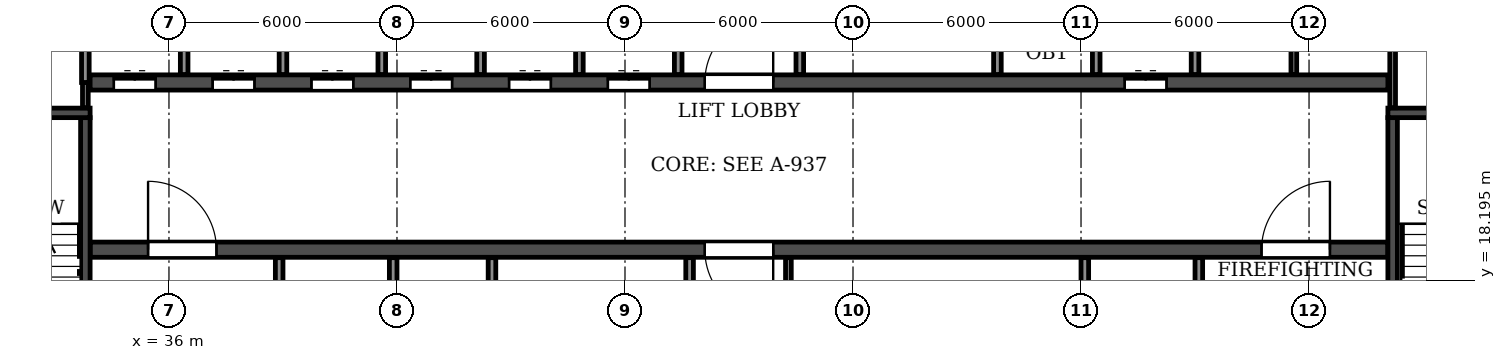
"""IFC4 building model, lengths in metres.
Left out: names, types, materials, properties, quantities, classifications, styles, units other than length and angle.
Written with IfcOpenShell. Run it as: python <this file> out.ifc"""

import sys

from ifc_helpers import new_model, si_unit, direction, frame, frame_2d, origin, place, context, subcontext, project, spatial, rectangle, extrude, element, fill, save


model = new_model("IFC4")
c1 = context("Model", 3, precision=1e-05, world=origin(), true_north=direction((0.0, 1.0)))
c2 = subcontext(c1, "Body", "Model", "MODEL_VIEW")
j1 = project(units=[si_unit("LENGTHUNIT", "METRE"), si_unit("PLANEANGLEUNIT", "RADIAN")], contexts=[c1])
p1 = place(None, origin())
s1 = spatial("IfcSite", under=j1, at=p1, CompositionType="ELEMENT")
p2 = place(p1, origin())
s2 = spatial("IfcBuilding", under=s1, at=p2, CompositionType="ELEMENT")
p3 = place(p2, frame((0.0, 0.0, 211.5)))
s3 = spatial("IfcBuildingStorey", under=s2, at=p3, CompositionType="ELEMENT", Elevation=211.5)
p4 = place(p3, frame((33.925, 19.0, 0.0), z_axis=(0.0, 0.0, 1.0), x_axis=(1.0, 0.0, 0.0)))
e1 = element("IfcWall", 1, at=p4, inside=s3, PredefinedType="SOLIDWALL", context=c2, shape_type="SweptSolid", body=[
    extrude(rectangle(XDim=34.15, YDim=0.4, at=frame_2d((17.075, 0.0))), origin(), (0.0, 0.0, 1.0), 2.95),
])
p5 = place(p4, frame((16.175, 0.0, 0.0)))
e2 = element("IfcOpeningElement", 2, at=p5, cuts=e1, PredefinedType="OPENING", context=c2, shape_type="SweptSolid", body=[
    extrude(rectangle(XDim=1.8, YDim=2.1, at=frame_2d((0.9, 1.05))), frame((0.0, 0.21, 0.0), z_axis=(0.0, -1.0, 0.0), x_axis=(1.0, 0.0, 0.0)), (0.0, 0.0, 1.0), 0.42),
])
p6 = place(p4, frame((1.525, 0.0, 0.0)))
e3 = element("IfcOpeningElement", 3, at=p6, cuts=e1, PredefinedType="OPENING", context=c2, shape_type="SweptSolid", body=[
    extrude(rectangle(XDim=1.8, YDim=2.1, at=frame_2d((0.9, 1.05))), frame((0.0, 0.21, 0.0), z_axis=(0.0, -1.0, 0.0), x_axis=(1.0, 0.0, 0.0)), (0.0, 0.0, 1.0), 0.42),
])
p7 = place(p4, frame((30.825, 0.0, 0.0)))
e4 = element("IfcOpeningElement", 4, at=p7, cuts=e1, PredefinedType="OPENING", context=c2, shape_type="SweptSolid", body=[
    extrude(rectangle(XDim=1.8, YDim=2.1, at=frame_2d((0.9, 1.05))), frame((0.0, 0.21, 0.0), z_axis=(0.0, -1.0, 0.0), x_axis=(1.0, 0.0, 0.0)), (0.0, 0.0, 1.0), 0.42),
])
p8 = place(p3, frame((33.925, 23.4, 0.0), z_axis=(0.0, 0.0, 1.0), x_axis=(1.0, 0.0, 0.0)))
e5 = element("IfcWall", 5, at=p8, inside=s3, PredefinedType="SOLIDWALL", context=c2, shape_type="SweptSolid", body=[
    extrude(rectangle(XDim=34.15, YDim=0.4, at=frame_2d((17.075, 0.0))), origin(), (0.0, 0.0, 1.0), 2.95),
])
p9 = place(p8, frame((16.175, 0.0, 0.0)))
e6 = element("IfcOpeningElement", 6, at=p9, cuts=e5, PredefinedType="OPENING", context=c2, shape_type="SweptSolid", body=[
    extrude(rectangle(XDim=1.8, YDim=2.1, at=frame_2d((0.9, 1.05))), frame((0.0, 0.21, 0.0), z_axis=(0.0, -1.0, 0.0), x_axis=(1.0, 0.0, 0.0)), (0.0, 0.0, 1.0), 0.42),
])
p10 = place(p8, frame((0.625, 0.0, 0.0)))
e7 = element("IfcOpeningElement", 7, at=p10, cuts=e5, PredefinedType="OPENING", context=c2, shape_type="SweptSolid", body=[
    extrude(rectangle(XDim=1.1, YDim=2.1, at=frame_2d((0.55, 1.05))), frame((0.0, 0.21, 0.0), z_axis=(0.0, -1.0, 0.0), x_axis=(1.0, 0.0, 0.0)), (0.0, 0.0, 1.0), 0.42),
])
p11 = place(p8, frame((3.225, 0.0, 0.0)))
e8 = element("IfcOpeningElement", 8, at=p11, cuts=e5, PredefinedType="OPENING", context=c2, shape_type="SweptSolid", body=[
    extrude(rectangle(XDim=1.1, YDim=2.1, at=frame_2d((0.55, 1.05))), frame((0.0, 0.21, 0.0), z_axis=(0.0, -1.0, 0.0), x_axis=(1.0, 0.0, 0.0)), (0.0, 0.0, 1.0), 0.42),
])
p12 = place(p8, frame((5.825, 0.0, 0.0)))
e9 = element("IfcOpeningElement", 9, at=p12, cuts=e5, PredefinedType="OPENING", context=c2, shape_type="SweptSolid", body=[
    extrude(rectangle(XDim=1.1, YDim=2.1, at=frame_2d((0.55, 1.05))), frame((0.0, 0.21, 0.0), z_axis=(0.0, -1.0, 0.0), x_axis=(1.0, 0.0, 0.0)), (0.0, 0.0, 1.0), 0.42),
])
p13 = place(p8, frame((8.425, 0.0, 0.0)))
e10 = element("IfcOpeningElement", 10, at=p13, cuts=e5, PredefinedType="OPENING", context=c2, shape_type="SweptSolid", body=[
    extrude(rectangle(XDim=1.1, YDim=2.1, at=frame_2d((0.55, 1.05))), frame((0.0, 0.21, 0.0), z_axis=(0.0, -1.0, 0.0), x_axis=(1.0, 0.0, 0.0)), (0.0, 0.0, 1.0), 0.42),
])
p14 = place(p8, frame((11.025, 0.0, 0.0)))
e11 = element("IfcOpeningElement", 11, at=p14, cuts=e5, PredefinedType="OPENING", context=c2, shape_type="SweptSolid", body=[
    extrude(rectangle(XDim=1.1, YDim=2.1, at=frame_2d((0.55, 1.05))), frame((0.0, 0.21, 0.0), z_axis=(0.0, -1.0, 0.0), x_axis=(1.0, 0.0, 0.0)), (0.0, 0.0, 1.0), 0.42),
])
p15 = place(p8, frame((13.625, 0.0, 0.0)))
e12 = element("IfcOpeningElement", 12, at=p15, cuts=e5, PredefinedType="OPENING", context=c2, shape_type="SweptSolid", body=[
    extrude(rectangle(XDim=1.1, YDim=2.1, at=frame_2d((0.55, 1.05))), frame((0.0, 0.21, 0.0), z_axis=(0.0, -1.0, 0.0), x_axis=(1.0, 0.0, 0.0)), (0.0, 0.0, 1.0), 0.42),
])
p16 = place(p8, frame((27.225, 0.0, 0.0)))
e13 = element("IfcOpeningElement", 13, at=p16, cuts=e5, PredefinedType="OPENING", context=c2, shape_type="SweptSolid", body=[
    extrude(rectangle(XDim=1.1, YDim=2.1, at=frame_2d((0.55, 1.05))), frame((0.0, 0.21, 0.0), z_axis=(0.0, -1.0, 0.0), x_axis=(1.0, 0.0, 0.0)), (0.0, 0.0, 1.0), 0.42),
])
p17 = place(p3, frame((33.8, 14.8, 0.0), z_axis=(0.0, 0.0, 1.0), x_axis=(0.0, 1.0, 0.0)))
e14 = element("IfcWall", 14, at=p17, inside=s3, PredefinedType="SOLIDWALL", context=c2, shape_type="SweptSolid", body=[
    extrude(rectangle(XDim=7.675, YDim=0.25, at=frame_2d((3.837, 0.0))), origin(), (0.0, 0.0, 1.0), 2.95),
])
p18 = place(p17, frame((0.5, 0.0, 0.0)))
e15 = element("IfcOpeningElement", 15, at=p18, cuts=e14, PredefinedType="OPENING", context=c2, shape_type="SweptSolid", body=[
    extrude(rectangle(XDim=1.0, YDim=2.1, at=frame_2d((0.5, 1.05))), frame((0.0, 0.135, 0.0), z_axis=(0.0, -1.0, 0.0), x_axis=(1.0, 0.0, 0.0)), (0.0, 0.0, 1.0), 0.27),
])
p19 = place(p3, frame((29.875, 22.6, 0.0), z_axis=(0.0, 0.0, 1.0), x_axis=(1.0, 0.0, 0.0)))
e16 = element("IfcWall", 16, at=p19, inside=s3, PredefinedType="SOLIDWALL", context=c2, shape_type="SweptSolid", body=[
    extrude(rectangle(XDim=4.05, YDim=0.25, at=frame_2d((2.025, 0.0))), origin(), (0.0, 0.0, 1.0), 2.95),
])
p20 = place(p3, frame((68.2, 14.8, 0.0), z_axis=(0.0, 0.0, 1.0), x_axis=(0.0, 1.0, 0.0)))
e17 = element("IfcWall", 17, at=p20, inside=s3, PredefinedType="SOLIDWALL", context=c2, shape_type="SweptSolid", body=[
    extrude(rectangle(XDim=7.675, YDim=0.25, at=frame_2d((3.837, 0.0))), origin(), (0.0, 0.0, 1.0), 2.95),
])
p21 = place(p20, frame((0.5, 0.0, 0.0)))
e18 = element("IfcOpeningElement", 18, at=p21, cuts=e17, PredefinedType="OPENING", context=c2, shape_type="SweptSolid", body=[
    extrude(rectangle(XDim=1.0, YDim=2.1, at=frame_2d((0.5, 1.05))), frame((0.0, 0.135, 0.0), z_axis=(0.0, -1.0, 0.0), x_axis=(1.0, 0.0, 0.0)), (0.0, 0.0, 1.0), 0.27),
])
p22 = place(p3, frame((68.075, 22.6, 0.0), z_axis=(0.0, 0.0, 1.0), x_axis=(1.0, 0.0, 0.0)))
e19 = element("IfcWall", 19, at=p22, inside=s3, PredefinedType="SOLIDWALL", context=c2, shape_type="SweptSolid", body=[
    extrude(rectangle(XDim=4.05, YDim=0.25, at=frame_2d((2.025, 0.0))), origin(), (0.0, 0.0, 1.0), 2.95),
])
for number, where, z_axis, x_axis in (
    (20, (52.3, 14.81, 0.0), (0.0, 0.0, 1.0), (0.0, 1.0, 0.0)),
    (21, (65.6, 23.61, 0.0), (0.0, 0.0, 1.0), (0.0, 1.0, 0.0)),
):
    element("IfcWall", number, at=place(p3, frame(where, z_axis=z_axis, x_axis=x_axis)), inside=s3, PredefinedType="PARTITIONING", context=c2, shape_type="SweptSolid", body=[
        extrude(rectangle(XDim=3.98, YDim=0.15, at=frame_2d((1.99, 0.0))), origin(), (0.0, 0.0, 1.0), 2.95),
    ])
for number, where, z_axis, x_axis in (
    (22, (44.5, 14.81, 0.0), (0.0, 0.0, 1.0), (0.0, 1.0, 0.0)),
    (23, (49.7, 14.81, 0.0), (0.0, 0.0, 1.0), (0.0, 1.0, 0.0)),
    (24, (52.6, 23.61, 0.0), (0.0, 0.0, 1.0), (0.0, 1.0, 0.0)),
):
    element("IfcWall", number, at=place(p3, frame(where, z_axis=z_axis, x_axis=x_axis)), inside=s3, PredefinedType="PARTITIONING", context=c2, shape_type="SweptSolid", body=[
        extrude(rectangle(XDim=3.98, YDim=0.2, at=frame_2d((1.99, 0.0))), origin(), (0.0, 0.0, 1.0), 2.95),
    ])
p23 = place(p3, frame((33.8, 22.735, 0.0), z_axis=(0.0, 0.0, 1.0), x_axis=(0.0, 1.0, 0.0)))
e25 = element("IfcWall", 25, at=p23, inside=s3, PredefinedType="PARTITIONING", context=c2, shape_type="SweptSolid", body=[
    extrude(rectangle(XDim=0.665, YDim=0.15, at=frame_2d((0.333, 0.0))), origin(), (0.0, 0.0, 1.0), 2.95),
])
p24 = place(p3, frame((68.2, 22.735, 0.0), z_axis=(0.0, 0.0, 1.0), x_axis=(0.0, 1.0, 0.0)))
e26 = element("IfcWall", 26, at=p24, inside=s3, PredefinedType="PARTITIONING", context=c2, shape_type="SweptSolid", body=[
    extrude(rectangle(XDim=4.855, YDim=0.15, at=frame_2d((2.427, 0.0))), origin(), (0.0, 0.0, 1.0), 2.95),
])
p25 = place(p3, frame((33.8, 23.4, 0.0), z_axis=(0.0, 0.0, 1.0), x_axis=(0.0, 1.0, 0.0)))
e27 = element("IfcWall", 27, at=p25, inside=s3, PredefinedType="PARTITIONING", context=c2, shape_type="SweptSolid", body=[
    extrude(rectangle(XDim=2.7, YDim=0.2, at=frame_2d((1.35, 0.0))), origin(), (0.0, 0.0, 1.0), 2.95),
])
p26 = place(p3, frame((36.4, 23.61, 0.0), z_axis=(0.0, 0.0, 1.0), x_axis=(0.0, 1.0, 0.0)))
e28 = element("IfcWall", 28, at=p26, inside=s3, PredefinedType="PARTITIONING", context=c2, shape_type="SweptSolid", body=[
    extrude(rectangle(XDim=2.49, YDim=0.2, at=frame_2d((1.245, 0.0))), origin(), (0.0, 0.0, 1.0), 2.95),
])
p27 = place(p3, frame((38.9, 14.81, 0.0), z_axis=(0.0, 0.0, 1.0), x_axis=(0.0, 1.0, 0.0)))
e29 = element("IfcWall", 29, at=p27, inside=s3, PredefinedType="PARTITIONING", context=c2, shape_type="SweptSolid", body=[
    extrude(rectangle(XDim=3.98, YDim=0.2, at=frame_2d((1.99, 0.0))), origin(), (0.0, 0.0, 1.0), 2.95),
])
p28 = place(p27, frame((1.44, 0.0, 0.0)))
e30 = element("IfcOpeningElement", 30, at=p28, cuts=e29, PredefinedType="OPENING", context=c2, shape_type="SweptSolid", body=[
    extrude(rectangle(XDim=1.1, YDim=2.1, at=frame_2d((0.55, 1.05))), frame((0.0, 0.11, 0.0), z_axis=(0.0, -1.0, 0.0), x_axis=(1.0, 0.0, 0.0)), (0.0, 0.0, 1.0), 0.22),
])
for number, where, z_axis, x_axis in (
    (31, (39.0, 23.61, 0.0), (0.0, 0.0, 1.0), (0.0, 1.0, 0.0)),
    (32, (41.6, 23.61, 0.0), (0.0, 0.0, 1.0), (0.0, 1.0, 0.0)),
):
    element("IfcWall", number, at=place(p3, frame(where, z_axis=z_axis, x_axis=x_axis)), inside=s3, PredefinedType="PARTITIONING", context=c2, shape_type="SweptSolid", body=[
        extrude(rectangle(XDim=2.49, YDim=0.2, at=frame_2d((1.245, 0.0))), origin(), (0.0, 0.0, 1.0), 2.95),
    ])
for number, where, z_axis, x_axis in (
    (33, (41.9, 14.81, 0.0), (0.0, 0.0, 1.0), (0.0, 1.0, 0.0)),
    (34, (44.2, 23.61, 0.0), (0.0, 0.0, 1.0), (0.0, 1.0, 0.0)),
    (35, (46.8, 23.61, 0.0), (0.0, 0.0, 1.0), (0.0, 1.0, 0.0)),
):
    element("IfcWall", number, at=place(p3, frame(where, z_axis=z_axis, x_axis=x_axis)), inside=s3, PredefinedType="PARTITIONING", context=c2, shape_type="SweptSolid", body=[
        extrude(rectangle(XDim=3.98, YDim=0.2, at=frame_2d((1.99, 0.0))), origin(), (0.0, 0.0, 1.0), 2.95),
    ])
for number, where, z_axis, x_axis in (
    (36, (49.4, 23.61, 0.0), (0.0, 0.0, 1.0), (0.0, 1.0, 0.0)),
    (37, (57.8, 23.61, 0.0), (0.0, 0.0, 1.0), (0.0, 1.0, 0.0)),
):
    element("IfcWall", number, at=place(p3, frame(where, z_axis=z_axis, x_axis=x_axis)), inside=s3, PredefinedType="PARTITIONING", context=c2, shape_type="SweptSolid", body=[
        extrude(rectangle(XDim=2.49, YDim=0.2, at=frame_2d((1.245, 0.0))), origin(), (0.0, 0.0, 1.0), 2.95),
    ])
p29 = place(p3, frame((60.1, 14.81, 0.0), z_axis=(0.0, 0.0, 1.0), x_axis=(0.0, 1.0, 0.0)))
e38 = element("IfcWall", 38, at=p29, inside=s3, PredefinedType="PARTITIONING", context=c2, shape_type="SweptSolid", body=[
    extrude(rectangle(XDim=3.98, YDim=0.2, at=frame_2d((1.99, 0.0))), origin(), (0.0, 0.0, 1.0), 2.95),
])
for number, where, z_axis, x_axis in (
    (39, (60.4, 23.61, 0.0), (0.0, 0.0, 1.0), (0.0, 1.0, 0.0)),
    (40, (63.0, 23.61, 0.0), (0.0, 0.0, 1.0), (0.0, 1.0, 0.0)),
):
    element("IfcWall", number, at=place(p3, frame(where, z_axis=z_axis, x_axis=x_axis)), inside=s3, PredefinedType="PARTITIONING", context=c2, shape_type="SweptSolid", body=[
        extrude(rectangle(XDim=2.49, YDim=0.2, at=frame_2d((1.245, 0.0))), origin(), (0.0, 0.0, 1.0), 2.95),
    ])
p30 = place(p3, frame((63.1, 14.81, 0.0), z_axis=(0.0, 0.0, 1.0), x_axis=(0.0, 1.0, 0.0)))
e41 = element("IfcWall", 41, at=p30, inside=s3, PredefinedType="PARTITIONING", context=c2, shape_type="SweptSolid", body=[
    extrude(rectangle(XDim=3.98, YDim=0.2, at=frame_2d((1.99, 0.0))), origin(), (0.0, 0.0, 1.0), 2.95),
])
p31 = place(p30, frame((1.44, 0.0, 0.0)))
e42 = element("IfcOpeningElement", 42, at=p31, cuts=e41, PredefinedType="OPENING", context=c2, shape_type="SweptSolid", body=[
    extrude(rectangle(XDim=1.1, YDim=2.1, at=frame_2d((0.55, 1.05))), frame((0.0, 0.11, 0.0), z_axis=(0.0, -1.0, 0.0), x_axis=(1.0, 0.0, 0.0)), (0.0, 0.0, 1.0), 0.22),
])
p32 = place(p9, origin())
e43 = element("IfcDoor", 43, at=p32, inside=s3, OperationType="DOUBLE_DOOR_SINGLE_SWING", PredefinedType="DOOR", context=c2, shape_type="SweptSolid", body=[
    extrude(rectangle(XDim=1.8, YDim=2.1, at=frame_2d((0.9, 1.05))), frame((0.0, 0.025, 0.0), z_axis=(0.0, -1.0, 0.0), x_axis=(1.0, 0.0, 0.0)), (0.0, 0.0, 1.0), 0.05),
])
fill(e6, e43)
p33 = place(p5, frame((1.8, 0.0, 0.0), z_axis=(0.0, 0.0, 1.0), x_axis=(-1.0, 0.0, 0.0)))
e44 = element("IfcDoor", 44, at=p33, inside=s3, OperationType="DOUBLE_DOOR_SINGLE_SWING", PredefinedType="DOOR", context=c2, shape_type="SweptSolid", body=[
    extrude(rectangle(XDim=1.8, YDim=2.1, at=frame_2d((0.9, 1.05))), frame((0.0, 0.025, 0.0), z_axis=(0.0, -1.0, 0.0), x_axis=(1.0, 0.0, 0.0)), (0.0, 0.0, 1.0), 0.05),
])
fill(e2, e44)
p34 = place(p10, origin())
e45 = element("IfcDoor", 45, at=p34, inside=s3, OperationType="DOUBLE_DOOR_SLIDING", PredefinedType="DOOR", context=c2, shape_type="SweptSolid", body=[
    extrude(rectangle(XDim=1.1, YDim=2.1, at=frame_2d((0.55, 1.05))), frame((0.0, 0.025, 0.0), z_axis=(0.0, -1.0, 0.0), x_axis=(1.0, 0.0, 0.0)), (0.0, 0.0, 1.0), 0.05),
])
fill(e7, e45)
p35 = place(p6, origin())
e46 = element("IfcDoor", 46, at=p35, inside=s3, OperationType="DOUBLE_DOOR_SINGLE_SWING", PredefinedType="DOOR", context=c2, shape_type="SweptSolid", body=[
    extrude(rectangle(XDim=1.8, YDim=2.1, at=frame_2d((0.9, 1.05))), frame((0.0, 0.025, 0.0), z_axis=(0.0, -1.0, 0.0), x_axis=(1.0, 0.0, 0.0)), (0.0, 0.0, 1.0), 0.05),
])
fill(e3, e46)
p36 = place(p11, origin())
e47 = element("IfcDoor", 47, at=p36, inside=s3, OperationType="DOUBLE_DOOR_SLIDING", PredefinedType="DOOR", context=c2, shape_type="SweptSolid", body=[
    extrude(rectangle(XDim=1.1, YDim=2.1, at=frame_2d((0.55, 1.05))), frame((0.0, 0.025, 0.0), z_axis=(0.0, -1.0, 0.0), x_axis=(1.0, 0.0, 0.0)), (0.0, 0.0, 1.0), 0.05),
])
fill(e8, e47)
p37 = place(p12, origin())
e48 = element("IfcDoor", 48, at=p37, inside=s3, OperationType="DOUBLE_DOOR_SLIDING", PredefinedType="DOOR", context=c2, shape_type="SweptSolid", body=[
    extrude(rectangle(XDim=1.1, YDim=2.1, at=frame_2d((0.55, 1.05))), frame((0.0, 0.025, 0.0), z_axis=(0.0, -1.0, 0.0), x_axis=(1.0, 0.0, 0.0)), (0.0, 0.0, 1.0), 0.05),
])
fill(e9, e48)
p38 = place(p13, origin())
e49 = element("IfcDoor", 49, at=p38, inside=s3, OperationType="DOUBLE_DOOR_SLIDING", PredefinedType="DOOR", context=c2, shape_type="SweptSolid", body=[
    extrude(rectangle(XDim=1.1, YDim=2.1, at=frame_2d((0.55, 1.05))), frame((0.0, 0.025, 0.0), z_axis=(0.0, -1.0, 0.0), x_axis=(1.0, 0.0, 0.0)), (0.0, 0.0, 1.0), 0.05),
])
fill(e10, e49)
p39 = place(p14, origin())
e50 = element("IfcDoor", 50, at=p39, inside=s3, OperationType="DOUBLE_DOOR_SLIDING", PredefinedType="DOOR", context=c2, shape_type="SweptSolid", body=[
    extrude(rectangle(XDim=1.1, YDim=2.1, at=frame_2d((0.55, 1.05))), frame((0.0, 0.025, 0.0), z_axis=(0.0, -1.0, 0.0), x_axis=(1.0, 0.0, 0.0)), (0.0, 0.0, 1.0), 0.05),
])
fill(e11, e50)
p40 = place(p15, origin())
e51 = element("IfcDoor", 51, at=p40, inside=s3, OperationType="DOUBLE_DOOR_SLIDING", PredefinedType="DOOR", context=c2, shape_type="SweptSolid", body=[
    extrude(rectangle(XDim=1.1, YDim=2.1, at=frame_2d((0.55, 1.05))), frame((0.0, 0.025, 0.0), z_axis=(0.0, -1.0, 0.0), x_axis=(1.0, 0.0, 0.0)), (0.0, 0.0, 1.0), 0.05),
])
fill(e12, e51)
p41 = place(p16, origin())
e52 = element("IfcDoor", 52, at=p41, inside=s3, OperationType="DOUBLE_DOOR_SLIDING", PredefinedType="DOOR", context=c2, shape_type="SweptSolid", body=[
    extrude(rectangle(XDim=1.1, YDim=2.1, at=frame_2d((0.55, 1.05))), frame((0.0, 0.025, 0.0), z_axis=(0.0, -1.0, 0.0), x_axis=(1.0, 0.0, 0.0)), (0.0, 0.0, 1.0), 0.05),
])
fill(e13, e52)
p42 = place(p7, origin())
e53 = element("IfcDoor", 53, at=p42, inside=s3, OperationType="DOUBLE_DOOR_SINGLE_SWING", PredefinedType="DOOR", context=c2, shape_type="SweptSolid", body=[
    extrude(rectangle(XDim=1.8, YDim=2.1, at=frame_2d((0.9, 1.05))), frame((0.0, 0.025, 0.0), z_axis=(0.0, -1.0, 0.0), x_axis=(1.0, 0.0, 0.0)), (0.0, 0.0, 1.0), 0.05),
])
fill(e4, e53)
save(model, sys.argv[1])
